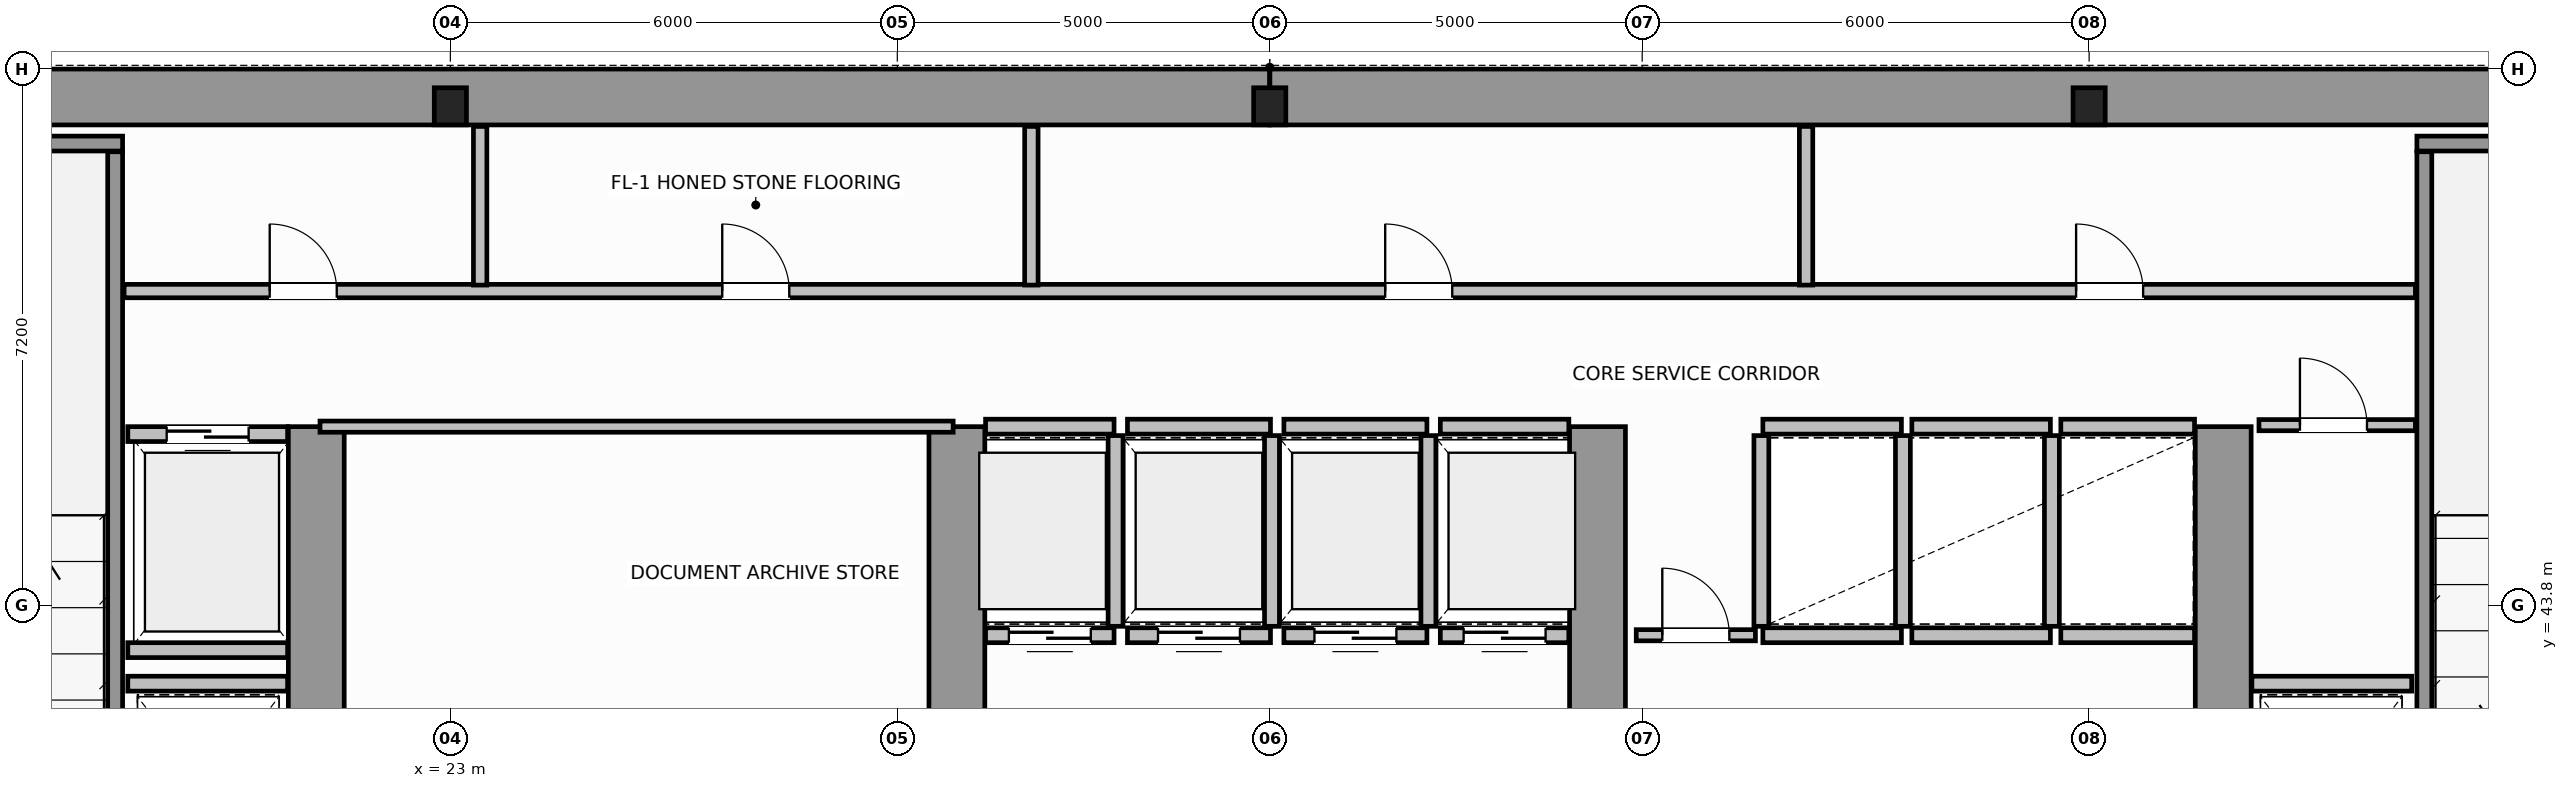
"""IFC4 building model, lengths in metres.
Left out: names, types, materials, properties, quantities, classifications, styles, units other than length and angle.
Written with IfcOpenShell. Run it as: python <this file> out.ifc"""

import sys

from ifc_helpers import new_model, si_unit, direction, frame, frame_2d, origin, origin_2d, place, context, subcontext, project, spatial, rectangle, i_section, extrude, source, transform, mapped, element, fill, save


model = new_model("IFC4")
c1 = context("Model", 3, precision=1e-05, world=origin(), true_north=direction((0.0, 1.0)))
c2 = subcontext(c1, "Body", "Model", "MODEL_VIEW")
j1 = project(units=[si_unit("LENGTHUNIT", "METRE"), si_unit("PLANEANGLEUNIT", "RADIAN")], contexts=[c1])
p1 = place(None, origin())
s1 = spatial("IfcSite", under=j1, at=p1, CompositionType="ELEMENT")
p2 = place(p1, origin())
s2 = spatial("IfcBuilding", under=s1, at=p2, CompositionType="ELEMENT")
p3 = place(p2, frame((0.0, 0.0, 161.4)))
s3 = spatial("IfcBuildingStorey", under=s2, at=p3, CompositionType="ELEMENT", Elevation=161.4)
m1 = source(origin(), c2, "Body", "SweptSolid", [
    extrude(i_section(OverallWidth=0.432, OverallDepth=0.498, WebThickness=0.055, FlangeThickness=0.068, FilletRadius=0.015, at=origin_2d()), origin(), (0.0, 0.0, 1.0), 3.8),
])
for number, where, z_axis, x_axis in (
    (1, (23.0, 50.5, 0.0), (0.0, 0.0, 1.0), (1.0, 0.0, 0.0)),
    (2, (34.0, 50.5, 0.0), (0.0, 0.0, 1.0), (1.0, 0.0, 0.0)),
    (3, (45.0, 50.5, 0.0), (0.0, 0.0, 1.0), (1.0, 0.0, 0.0)),
):
    element("IfcColumn", number, at=place(p3, frame(where, z_axis=z_axis, x_axis=x_axis)), inside=s3, PredefinedType="COLUMN", context=c2, shape_type="MappedRepresentation", body=[
        mapped(m1, transform((0.0, 0.0, 0.0), scale=1.0)),
    ])
for number, where, z_axis, x_axis in (
    (4, (14.379, 50.625, 0.0), (0.0, 0.0, 1.0), (1.0, 0.0, 0.0)),
    (5, (34.002, 50.625, 0.0), (0.0, 0.0, 1.0), (1.0, 0.0, 0.0)),
):
    element("IfcWall", number, at=place(p3, frame(where, z_axis=z_axis, x_axis=x_axis)), inside=s3, PredefinedType="SHEAR", context=c2, shape_type="SweptSolid", body=[
        extrude(rectangle(XDim=19.619, YDim=0.75, at=frame_2d((9.81, 0.0))), origin(), (0.0, 0.0, 1.0), 3.8),
    ])
for number, where, z_axis, x_axis in (
    (6, (21.2, 36.895, 0.0), (0.0, 0.0, 1.0), (0.0, 1.0, 0.0)),
    (7, (29.8, 36.895, 0.0), (0.0, 0.0, 1.0), (0.0, 1.0, 0.0)),
    (8, (38.4, 36.895, 0.0), (0.0, 0.0, 1.0), (0.0, 1.0, 0.0)),
    (9, (46.8, 36.895, 0.0), (0.0, 0.0, 1.0), (0.0, 1.0, 0.0)),
):
    element("IfcWall", number, at=place(p3, frame(where, z_axis=z_axis, x_axis=x_axis)), inside=s3, PredefinedType="SHEAR", context=c2, shape_type="SweptSolid", body=[
        extrude(rectangle(XDim=9.305, YDim=0.75, at=frame_2d((4.652, 0.0))), origin(), (0.0, 0.0, 1.0), 3.8),
    ])
p4 = place(p3, frame((14.375, 50.0, 0.0), z_axis=(0.0, 0.0, 1.0), x_axis=(1.0, 0.0, 0.0)))
e10 = element("IfcWall", 10, at=p4, inside=s3, PredefinedType="SOLIDWALL", context=c2, shape_type="SweptSolid", body=[
    extrude(rectangle(XDim=4.225, YDim=0.2, at=frame_2d((2.113, 0.0))), origin(), (0.0, 0.0, 1.0), 3.8),
])
p5 = place(p3, frame((18.5, 39.96, 0.0), z_axis=(0.0, 0.0, 1.0), x_axis=(0.0, 1.0, 0.0)))
e11 = element("IfcWall", 11, at=p5, inside=s3, PredefinedType="SOLIDWALL", context=c2, shape_type="SweptSolid", body=[
    extrude(rectangle(XDim=9.93, YDim=0.2, at=frame_2d((4.965, 0.0))), origin(), (0.0, 0.0, 1.0), 3.8),
])
p6 = place(p3, frame((49.4, 50.0, 0.0), z_axis=(0.0, 0.0, 1.0), x_axis=(1.0, 0.0, 0.0)))
e12 = element("IfcWall", 12, at=p6, inside=s3, PredefinedType="SOLIDWALL", context=c2, shape_type="SweptSolid", body=[
    extrude(rectangle(XDim=4.225, YDim=0.2, at=frame_2d((2.113, 0.0))), origin(), (0.0, 0.0, 1.0), 3.8),
])
p7 = place(p3, frame((49.5, 39.96, 0.0), z_axis=(0.0, 0.0, 1.0), x_axis=(0.0, 1.0, 0.0)))
e13 = element("IfcWall", 13, at=p7, inside=s3, PredefinedType="SOLIDWALL", context=c2, shape_type="SweptSolid", body=[
    extrude(rectangle(XDim=9.93, YDim=0.2, at=frame_2d((4.965, 0.0))), origin(), (0.0, 0.0, 1.0), 3.8),
])
p8 = place(p3, frame((30.185, 43.4, 0.0), z_axis=(0.0, 0.0, 1.0), x_axis=(1.0, 0.0, 0.0)))
e14 = element("IfcWall", 14, at=p8, inside=s3, PredefinedType="SOLIDWALL", context=c2, shape_type="SweptSolid", body=[
    extrude(rectangle(XDim=1.725, YDim=0.2, at=frame_2d((0.862, 0.0))), origin(), (0.0, 0.0, 1.0), 3.58),
])
p9 = place(p8, frame((0.313, 0.0, 0.0)))
e15 = element("IfcOpeningElement", 15, at=p9, cuts=e14, PredefinedType="OPENING", context=c2, shape_type="SweptSolid", body=[
    extrude(rectangle(XDim=1.1, YDim=2.15, at=frame_2d((0.55, 1.075))), frame((0.0, 0.11, 0.0), z_axis=(0.0, -1.0, 0.0), x_axis=(1.0, 0.0, 0.0)), (0.0, 0.0, 1.0), 0.22),
])
p10 = place(p3, frame((30.185, 46.2, 0.0), z_axis=(0.0, 0.0, 1.0), x_axis=(1.0, 0.0, 0.0)))
e16 = element("IfcWall", 16, at=p10, inside=s3, PredefinedType="SOLIDWALL", context=c2, shape_type="SweptSolid", body=[
    extrude(rectangle(XDim=1.725, YDim=0.2, at=frame_2d((0.862, 0.0))), origin(), (0.0, 0.0, 1.0), 3.58),
])
p11 = place(p3, frame((31.93, 43.52, 0.0), z_axis=(0.0, 0.0, 1.0), x_axis=(0.0, 1.0, 0.0)))
e17 = element("IfcWall", 17, at=p11, inside=s3, PredefinedType="SOLIDWALL", context=c2, shape_type="SweptSolid", body=[
    extrude(rectangle(XDim=2.56, YDim=0.2, at=frame_2d((1.28, 0.0))), origin(), (0.0, 0.0, 1.0), 3.58),
])
p12 = place(p3, frame((32.09, 43.4, 0.0), z_axis=(0.0, 0.0, 1.0), x_axis=(1.0, 0.0, 0.0)))
e18 = element("IfcWall", 18, at=p12, inside=s3, PredefinedType="SOLIDWALL", context=c2, shape_type="SweptSolid", body=[
    extrude(rectangle(XDim=1.92, YDim=0.2, at=frame_2d((0.96, 0.0))), origin(), (0.0, 0.0, 1.0), 3.58),
])
p13 = place(p12, frame((0.41, 0.0, 0.0)))
e19 = element("IfcOpeningElement", 19, at=p13, cuts=e18, PredefinedType="OPENING", context=c2, shape_type="SweptSolid", body=[
    extrude(rectangle(XDim=1.1, YDim=2.15, at=frame_2d((0.55, 1.075))), frame((0.0, 0.11, 0.0), z_axis=(0.0, -1.0, 0.0), x_axis=(1.0, 0.0, 0.0)), (0.0, 0.0, 1.0), 0.22),
])
p14 = place(p3, frame((32.09, 46.2, 0.0), z_axis=(0.0, 0.0, 1.0), x_axis=(1.0, 0.0, 0.0)))
e20 = element("IfcWall", 20, at=p14, inside=s3, PredefinedType="SOLIDWALL", context=c2, shape_type="SweptSolid", body=[
    extrude(rectangle(XDim=1.92, YDim=0.2, at=frame_2d((0.96, 0.0))), origin(), (0.0, 0.0, 1.0), 3.58),
])
p15 = place(p3, frame((34.03, 43.52, 0.0), z_axis=(0.0, 0.0, 1.0), x_axis=(0.0, 1.0, 0.0)))
e21 = element("IfcWall", 21, at=p15, inside=s3, PredefinedType="SOLIDWALL", context=c2, shape_type="SweptSolid", body=[
    extrude(rectangle(XDim=2.56, YDim=0.2, at=frame_2d((1.28, 0.0))), origin(), (0.0, 0.0, 1.0), 3.58),
])
p16 = place(p3, frame((34.19, 43.4, 0.0), z_axis=(0.0, 0.0, 1.0), x_axis=(1.0, 0.0, 0.0)))
e22 = element("IfcWall", 22, at=p16, inside=s3, PredefinedType="SOLIDWALL", context=c2, shape_type="SweptSolid", body=[
    extrude(rectangle(XDim=1.92, YDim=0.2, at=frame_2d((0.96, 0.0))), origin(), (0.0, 0.0, 1.0), 3.58),
])
p17 = place(p16, frame((0.41, 0.0, 0.0)))
e23 = element("IfcOpeningElement", 23, at=p17, cuts=e22, PredefinedType="OPENING", context=c2, shape_type="SweptSolid", body=[
    extrude(rectangle(XDim=1.1, YDim=2.15, at=frame_2d((0.55, 1.075))), frame((0.0, 0.11, 0.0), z_axis=(0.0, -1.0, 0.0), x_axis=(1.0, 0.0, 0.0)), (0.0, 0.0, 1.0), 0.22),
])
p18 = place(p3, frame((34.19, 46.2, 0.0), z_axis=(0.0, 0.0, 1.0), x_axis=(1.0, 0.0, 0.0)))
e24 = element("IfcWall", 24, at=p18, inside=s3, PredefinedType="SOLIDWALL", context=c2, shape_type="SweptSolid", body=[
    extrude(rectangle(XDim=1.92, YDim=0.2, at=frame_2d((0.96, 0.0))), origin(), (0.0, 0.0, 1.0), 3.58),
])
p19 = place(p3, frame((36.13, 43.52, 0.0), z_axis=(0.0, 0.0, 1.0), x_axis=(0.0, 1.0, 0.0)))
e25 = element("IfcWall", 25, at=p19, inside=s3, PredefinedType="SOLIDWALL", context=c2, shape_type="SweptSolid", body=[
    extrude(rectangle(XDim=2.56, YDim=0.2, at=frame_2d((1.28, 0.0))), origin(), (0.0, 0.0, 1.0), 3.58),
])
p20 = place(p3, frame((36.29, 43.4, 0.0), z_axis=(0.0, 0.0, 1.0), x_axis=(1.0, 0.0, 0.0)))
e26 = element("IfcWall", 26, at=p20, inside=s3, PredefinedType="SOLIDWALL", context=c2, shape_type="SweptSolid", body=[
    extrude(rectangle(XDim=1.725, YDim=0.2, at=frame_2d((0.862, 0.0))), origin(), (0.0, 0.0, 1.0), 3.58),
])
p21 = place(p20, frame((0.313, 0.0, 0.0)))
e27 = element("IfcOpeningElement", 27, at=p21, cuts=e26, PredefinedType="OPENING", context=c2, shape_type="SweptSolid", body=[
    extrude(rectangle(XDim=1.1, YDim=2.15, at=frame_2d((0.55, 1.075))), frame((0.0, 0.11, 0.0), z_axis=(0.0, -1.0, 0.0), x_axis=(1.0, 0.0, 0.0)), (0.0, 0.0, 1.0), 0.22),
])
p22 = place(p3, frame((36.29, 46.2, 0.0), z_axis=(0.0, 0.0, 1.0), x_axis=(1.0, 0.0, 0.0)))
e28 = element("IfcWall", 28, at=p22, inside=s3, PredefinedType="SOLIDWALL", context=c2, shape_type="SweptSolid", body=[
    extrude(rectangle(XDim=1.725, YDim=0.2, at=frame_2d((0.862, 0.0))), origin(), (0.0, 0.0, 1.0), 3.58),
])
for number, where, z_axis, x_axis in (
    (29, (40.62, 43.4, 0.0), (0.0, 0.0, 1.0), (1.0, 0.0, 0.0)),
    (30, (40.62, 46.2, 0.0), (0.0, 0.0, 1.0), (1.0, 0.0, 0.0)),
):
    element("IfcWall", number, at=place(p3, frame(where, z_axis=z_axis, x_axis=x_axis)), inside=s3, PredefinedType="SOLIDWALL", context=c2, shape_type="SweptSolid", body=[
        extrude(rectangle(XDim=1.86, YDim=0.2, at=frame_2d((0.93, 0.0))), origin(), (0.0, 0.0, 1.0), 3.58),
    ])
for number, where, z_axis, x_axis in (
    (31, (40.6, 43.52, 0.0), (0.0, 0.0, 1.0), (0.0, 1.0, 0.0)),
    (32, (42.5, 43.52, 0.0), (0.0, 0.0, 1.0), (0.0, 1.0, 0.0)),
):
    element("IfcWall", number, at=place(p3, frame(where, z_axis=z_axis, x_axis=x_axis)), inside=s3, PredefinedType="SOLIDWALL", context=c2, shape_type="SweptSolid", body=[
        extrude(rectangle(XDim=2.56, YDim=0.2, at=frame_2d((1.28, 0.0))), origin(), (0.0, 0.0, 1.0), 3.58),
    ])
for number, where, z_axis, x_axis in (
    (33, (42.62, 43.4, 0.0), (0.0, 0.0, 1.0), (1.0, 0.0, 0.0)),
    (34, (42.62, 46.2, 0.0), (0.0, 0.0, 1.0), (1.0, 0.0, 0.0)),
):
    element("IfcWall", number, at=place(p3, frame(where, z_axis=z_axis, x_axis=x_axis)), inside=s3, PredefinedType="SOLIDWALL", context=c2, shape_type="SweptSolid", body=[
        extrude(rectangle(XDim=1.86, YDim=0.2, at=frame_2d((0.93, 0.0))), origin(), (0.0, 0.0, 1.0), 3.58),
    ])
p23 = place(p3, frame((44.5, 43.52, 0.0), z_axis=(0.0, 0.0, 1.0), x_axis=(0.0, 1.0, 0.0)))
e35 = element("IfcWall", 35, at=p23, inside=s3, PredefinedType="SOLIDWALL", context=c2, shape_type="SweptSolid", body=[
    extrude(rectangle(XDim=2.56, YDim=0.2, at=frame_2d((1.28, 0.0))), origin(), (0.0, 0.0, 1.0), 3.58),
])
for number, where, z_axis, x_axis in (
    (36, (44.62, 43.4, 0.0), (0.0, 0.0, 1.0), (1.0, 0.0, 0.0)),
    (37, (44.62, 46.2, 0.0), (0.0, 0.0, 1.0), (1.0, 0.0, 0.0)),
):
    element("IfcWall", number, at=place(p3, frame(where, z_axis=z_axis, x_axis=x_axis)), inside=s3, PredefinedType="SOLIDWALL", context=c2, shape_type="SweptSolid", body=[
        extrude(rectangle(XDim=1.795, YDim=0.2, at=frame_2d((0.897, 0.0))), origin(), (0.0, 0.0, 1.0), 3.58),
    ])
p24 = place(p3, frame((18.67, 46.1, 0.0), z_axis=(0.0, 0.0, 1.0), x_axis=(1.0, 0.0, 0.0)))
e38 = element("IfcWall", 38, at=p24, inside=s3, PredefinedType="SOLIDWALL", context=c2, shape_type="SweptSolid", body=[
    extrude(rectangle(XDim=2.145, YDim=0.2, at=frame_2d((1.073, 0.0))), origin(), (0.0, 0.0, 1.0), 3.58),
])
p25 = place(p24, frame((0.522, 0.0, 0.0)))
e39 = element("IfcOpeningElement", 39, at=p25, cuts=e38, PredefinedType="OPENING", context=c2, shape_type="SweptSolid", body=[
    extrude(rectangle(XDim=1.1, YDim=2.15, at=frame_2d((0.55, 1.075))), frame((0.0, 0.11, 0.0), z_axis=(0.0, -1.0, 0.0), x_axis=(1.0, 0.0, 0.0)), (0.0, 0.0, 1.0), 0.22),
])
for number, where, z_axis, x_axis in (
    (40, (18.67, 43.2, 0.0), (0.0, 0.0, 1.0), (1.0, 0.0, 0.0)),
    (41, (18.67, 42.75, 0.0), (0.0, 0.0, 1.0), (1.0, 0.0, 0.0)),
    (42, (47.185, 42.75, 0.0), (0.0, 0.0, 1.0), (1.0, 0.0, 0.0)),
):
    element("IfcWall", number, at=place(p3, frame(where, z_axis=z_axis, x_axis=x_axis)), inside=s3, PredefinedType="SOLIDWALL", context=c2, shape_type="SweptSolid", body=[
        extrude(rectangle(XDim=2.145, YDim=0.2, at=frame_2d((1.073, 0.0))), origin(), (0.0, 0.0, 1.0), 3.58),
    ])
p26 = place(p3, frame((21.25, 46.2, 0.0), z_axis=(0.0, 0.0, 1.0), x_axis=(1.0, 0.0, 0.0)))
e43 = element("IfcWall", 43, at=p26, inside=s3, PredefinedType="PARTITIONING", context=c2, shape_type="SweptSolid", body=[
    extrude(rectangle(XDim=8.5, YDim=0.15, at=frame_2d((4.25, 0.0))), origin(), (0.0, 0.0, 1.0), 3.58),
])
p27 = place(p3, frame((47.28, 46.22, 0.0), z_axis=(0.0, 0.0, 1.0), x_axis=(1.0, 0.0, 0.0)))
e44 = element("IfcWall", 44, at=p27, inside=s3, PredefinedType="PARTITIONING", context=c2, shape_type="SweptSolid", body=[
    extrude(rectangle(XDim=2.1, YDim=0.15, at=frame_2d((1.05, 0.0))), origin(), (0.0, 0.0, 1.0), 3.58),
])
p28 = place(p27, frame((0.55, 0.0, 0.0)))
e45 = element("IfcOpeningElement", 45, at=p28, cuts=e44, PredefinedType="OPENING", context=c2, shape_type="SweptSolid", body=[
    extrude(rectangle(XDim=0.9, YDim=2.1, at=frame_2d((0.45, 1.05))), frame((0.0, 0.085, 0.0), z_axis=(0.0, -1.0, 0.0), x_axis=(1.0, 0.0, 0.0)), (0.0, 0.0, 1.0), 0.17),
])
p29 = place(p3, frame((38.92, 43.4, 0.0), z_axis=(0.0, 0.0, 1.0), x_axis=(1.0, 0.0, 0.0)))
e46 = element("IfcWall", 46, at=p29, inside=s3, PredefinedType="PARTITIONING", context=c2, shape_type="SweptSolid", body=[
    extrude(rectangle(XDim=1.6, YDim=0.15, at=frame_2d((0.8, 0.0))), origin(), (0.0, 0.0, 1.0), 3.58),
])
p30 = place(p29, frame((0.35, 0.0, 0.0)))
e47 = element("IfcOpeningElement", 47, at=p30, cuts=e46, PredefinedType="OPENING", context=c2, shape_type="SweptSolid", body=[
    extrude(rectangle(XDim=0.9, YDim=2.1, at=frame_2d((0.45, 1.05))), frame((0.0, 0.085, 0.0), z_axis=(0.0, -1.0, 0.0), x_axis=(1.0, 0.0, 0.0)), (0.0, 0.0, 1.0), 0.17),
])
p31 = place(p3, frame((18.62, 48.02, 0.0), z_axis=(0.0, 0.0, 1.0), x_axis=(1.0, 0.0, 0.0)))
e48 = element("IfcWall", 48, at=p31, inside=s3, PredefinedType="PLUMBINGWALL", context=c2, shape_type="SweptSolid", body=[
    extrude(rectangle(XDim=30.76, YDim=0.18, at=frame_2d((15.38, 0.0))), origin(), (0.0, 0.0, 1.0), 3.58),
])
p32 = place(p31, frame((1.955, 0.0, 0.0)))
e49 = element("IfcOpeningElement", 49, at=p32, cuts=e48, PredefinedType="OPENING", context=c2, shape_type="SweptSolid", body=[
    extrude(rectangle(XDim=0.9, YDim=2.15, at=frame_2d((0.45, 1.075))), frame((0.0, 0.1, 0.0), z_axis=(0.0, -1.0, 0.0), x_axis=(1.0, 0.0, 0.0)), (0.0, 0.0, 1.0), 0.2),
])
p33 = place(p31, frame((8.03, 0.0, 0.0)))
e50 = element("IfcOpeningElement", 50, at=p33, cuts=e48, PredefinedType="OPENING", context=c2, shape_type="SweptSolid", body=[
    extrude(rectangle(XDim=0.9, YDim=2.15, at=frame_2d((0.45, 1.075))), frame((0.0, 0.1, 0.0), z_axis=(0.0, -1.0, 0.0), x_axis=(1.0, 0.0, 0.0)), (0.0, 0.0, 1.0), 0.2),
])
p34 = place(p31, frame((16.93, 0.0, 0.0)))
e51 = element("IfcOpeningElement", 51, at=p34, cuts=e48, PredefinedType="OPENING", context=c2, shape_type="SweptSolid", body=[
    extrude(rectangle(XDim=0.9, YDim=2.15, at=frame_2d((0.45, 1.075))), frame((0.0, 0.1, 0.0), z_axis=(0.0, -1.0, 0.0), x_axis=(1.0, 0.0, 0.0)), (0.0, 0.0, 1.0), 0.2),
])
p35 = place(p31, frame((26.205, 0.0, 0.0)))
e52 = element("IfcOpeningElement", 52, at=p35, cuts=e48, PredefinedType="OPENING", context=c2, shape_type="SweptSolid", body=[
    extrude(rectangle(XDim=0.9, YDim=2.15, at=frame_2d((0.45, 1.075))), frame((0.0, 0.1, 0.0), z_axis=(0.0, -1.0, 0.0), x_axis=(1.0, 0.0, 0.0)), (0.0, 0.0, 1.0), 0.2),
])
for number, where, z_axis, x_axis in (
    (53, (23.4, 48.1, 0.0), (0.0, 0.0, 1.0), (0.0, 1.0, 0.0)),
    (54, (30.8, 48.1, 0.0), (0.0, 0.0, 1.0), (0.0, 1.0, 0.0)),
    (55, (41.2, 48.1, 0.0), (0.0, 0.0, 1.0), (0.0, 1.0, 0.0)),
):
    element("IfcWall", number, at=place(p3, frame(where, z_axis=z_axis, x_axis=x_axis)), inside=s3, PredefinedType="PLUMBINGWALL", context=c2, shape_type="SweptSolid", body=[
        extrude(rectangle(XDim=2.13, YDim=0.18, at=frame_2d((1.065, 0.0))), origin(), (0.0, 0.0, 1.0), 3.58),
    ])
m2 = source(origin(), c2, "Body", "SweptSolid", [
    extrude(rectangle(XDim=1.1, YDim=2.15, at=frame_2d((0.55, 1.075))), frame((0.0, 0.025, 0.0), z_axis=(0.0, -1.0, 0.0), x_axis=(1.0, 0.0, 0.0)), (0.0, 0.0, 1.0), 0.05),
])
p36 = place(p9, origin())
e56 = element("IfcDoor", 56, at=p36, inside=s3, OperationType="DOUBLE_DOOR_SLIDING", PredefinedType="DOOR", context=c2, shape_type="MappedRepresentation", body=[
    mapped(m2, transform((0.0, 0.0, 0.0), scale=1.0)),
])
fill(e15, e56)
p37 = place(p13, origin())
e57 = element("IfcDoor", 57, at=p37, inside=s3, OperationType="DOUBLE_DOOR_SLIDING", PredefinedType="DOOR", context=c2, shape_type="MappedRepresentation", body=[
    mapped(m2, transform((0.0, 0.0, 0.0), scale=1.0)),
])
fill(e19, e57)
p38 = place(p17, origin())
e58 = element("IfcDoor", 58, at=p38, inside=s3, OperationType="DOUBLE_DOOR_SLIDING", PredefinedType="DOOR", context=c2, shape_type="MappedRepresentation", body=[
    mapped(m2, transform((0.0, 0.0, 0.0), scale=1.0)),
])
fill(e23, e58)
p39 = place(p21, origin())
e59 = element("IfcDoor", 59, at=p39, inside=s3, OperationType="DOUBLE_DOOR_SLIDING", PredefinedType="DOOR", context=c2, shape_type="MappedRepresentation", body=[
    mapped(m2, transform((0.0, 0.0, 0.0), scale=1.0)),
])
fill(e27, e59)
p40 = place(p25, origin())
e60 = element("IfcDoor", 60, at=p40, inside=s3, OperationType="DOUBLE_DOOR_SLIDING", PredefinedType="DOOR", context=c2, shape_type="MappedRepresentation", body=[
    mapped(m2, transform((0.0, 0.0, 0.0), scale=1.0)),
])
fill(e39, e60)
m3 = source(origin(), c2, "Body", "SweptSolid", [
    extrude(rectangle(XDim=0.9, YDim=2.1, at=frame_2d((0.45, 1.05))), frame((0.0, 0.025, 0.0), z_axis=(0.0, -1.0, 0.0), x_axis=(1.0, 0.0, 0.0)), (0.0, 0.0, 1.0), 0.05),
])
p41 = place(p28, origin())
e61 = element("IfcDoor", 61, at=p41, inside=s3, OperationType="SINGLE_SWING_RIGHT", PredefinedType="DOOR", context=c2, shape_type="MappedRepresentation", body=[
    mapped(m3, transform((0.0, 0.0, 0.0), scale=1.0)),
])
fill(e45, e61)
p42 = place(p30, origin())
e62 = element("IfcDoor", 62, at=p42, inside=s3, OperationType="SINGLE_SWING_LEFT", PredefinedType="DOOR", context=c2, shape_type="MappedRepresentation", body=[
    mapped(m3, transform((0.0, 0.0, 0.0), scale=1.0)),
])
fill(e47, e62)
m4 = source(origin(), c2, "Body", "SweptSolid", [
    extrude(rectangle(XDim=0.9, YDim=2.15, at=frame_2d((0.45, 1.075))), frame((0.0, 0.025, 0.0), z_axis=(0.0, -1.0, 0.0), x_axis=(1.0, 0.0, 0.0)), (0.0, 0.0, 1.0), 0.05),
])
p43 = place(p32, origin())
e63 = element("IfcDoor", 63, at=p43, inside=s3, OperationType="SINGLE_SWING_LEFT", PredefinedType="DOOR", context=c2, shape_type="MappedRepresentation", body=[
    mapped(m4, transform((0.0, 0.0, 0.0), scale=1.0)),
])
fill(e49, e63)
p44 = place(p33, origin())
e64 = element("IfcDoor", 64, at=p44, inside=s3, OperationType="SINGLE_SWING_RIGHT", PredefinedType="DOOR", context=c2, shape_type="MappedRepresentation", body=[
    mapped(m4, transform((0.0, 0.0, 0.0), scale=1.0)),
])
fill(e50, e64)
p45 = place(p34, origin())
e65 = element("IfcDoor", 65, at=p45, inside=s3, OperationType="SINGLE_SWING_LEFT", PredefinedType="DOOR", context=c2, shape_type="MappedRepresentation", body=[
    mapped(m4, transform((0.0, 0.0, 0.0), scale=1.0)),
])
fill(e51, e65)
p46 = place(p35, origin())
e66 = element("IfcDoor", 66, at=p46, inside=s3, OperationType="SINGLE_SWING_RIGHT", PredefinedType="DOOR", context=c2, shape_type="MappedRepresentation", body=[
    mapped(m4, transform((0.0, 0.0, 0.0), scale=1.0)),
])
fill(e52, e66)
save(model, sys.argv[1])
